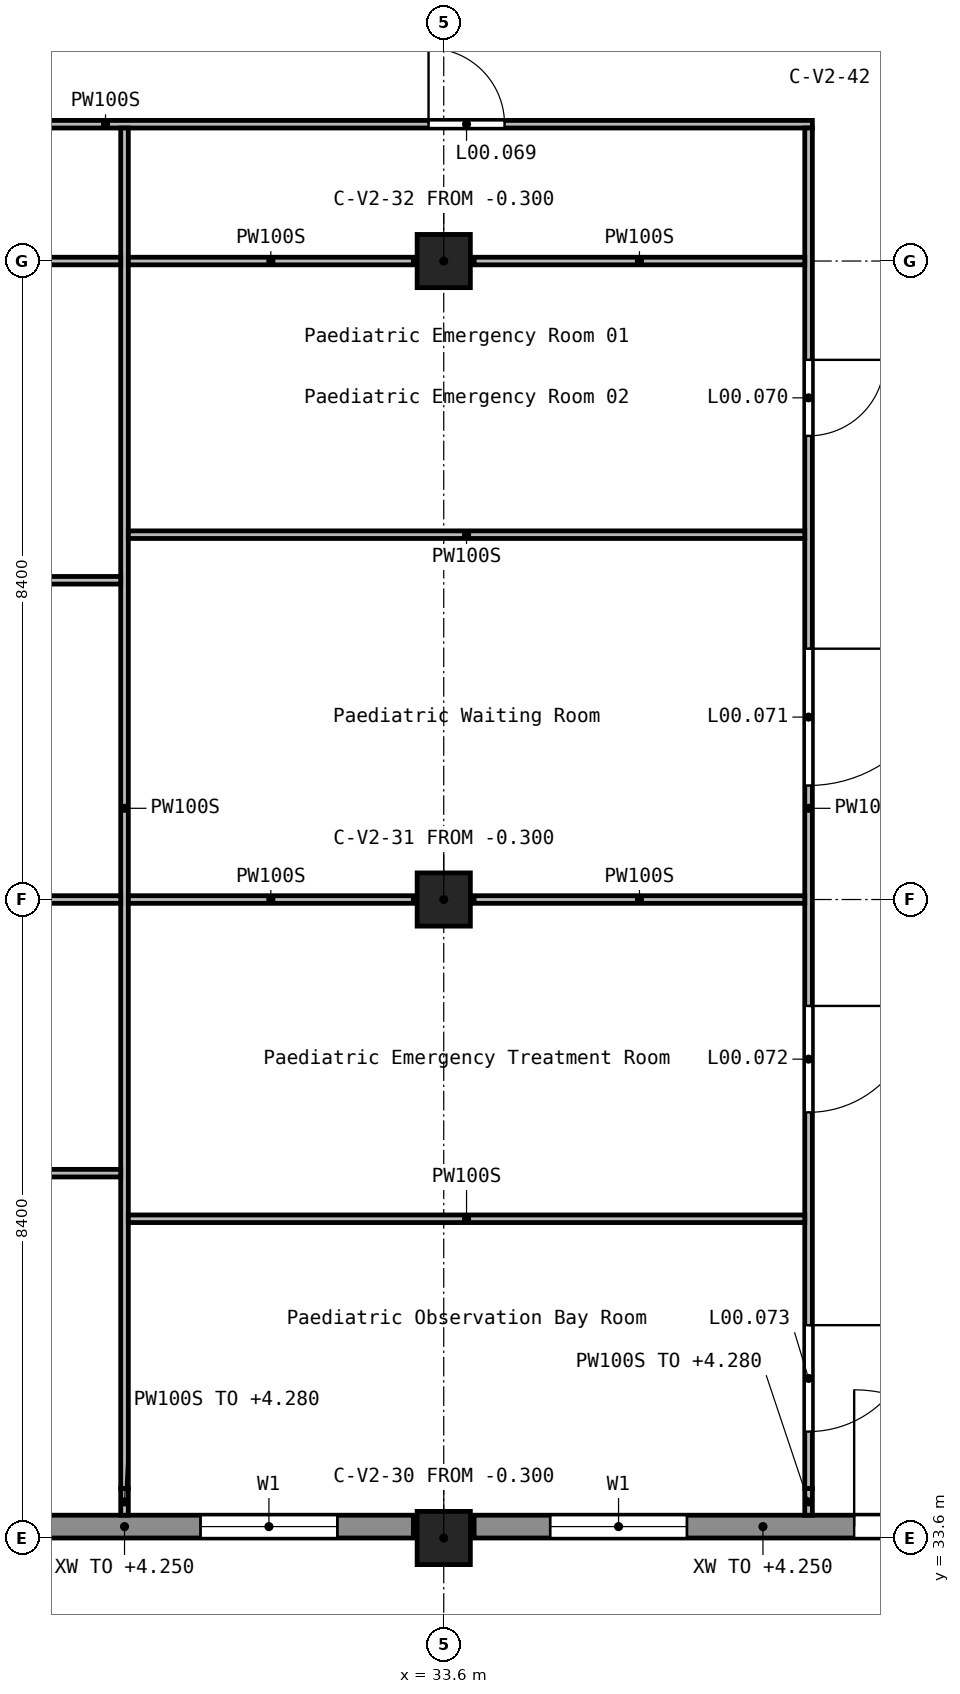
"""IFC4 building model, lengths in metres.
Left out: names, types, materials, properties, quantities, classifications, styles, units other than length and angle.
Written with IfcOpenShell. Run it as: python <this file> out.ifc"""

import sys

from ifc_helpers import new_model, si_unit, direction, frame, frame_2d, origin, origin_2d, place, context, subcontext, project, spatial, rectangle, extrude, element, fill, save


model = new_model("IFC4")
c1 = context("Model", 3, precision=1e-05, world=origin(), true_north=direction((0.0, 1.0)))
c2 = subcontext(c1, "Body", "Model", "MODEL_VIEW")
j1 = project(units=[si_unit("LENGTHUNIT", "METRE"), si_unit("PLANEANGLEUNIT", "RADIAN")], contexts=[c1])
p1 = place(None, origin())
s1 = spatial("IfcSite", under=j1, at=p1, CompositionType="ELEMENT")
p2 = place(p1, origin())
s2 = spatial("IfcBuilding", under=s1, at=p2, CompositionType="ELEMENT")
p3 = place(p2, origin())
s3 = spatial("IfcBuildingStorey", under=s2, at=p3, CompositionType="ELEMENT", Elevation=0.0)
for number, where, z_axis, x_axis in (
    (1, (33.6, 33.6, -0.3), (0.0, 0.0, 1.0), (1.0, 0.0, 0.0)),
    (2, (33.6, 42.0, -0.3), (0.0, 0.0, 1.0), (1.0, 0.0, 0.0)),
    (3, (33.6, 50.4, -0.3), (0.0, 0.0, 1.0), (1.0, 0.0, 0.0)),
):
    element("IfcColumn", number, at=place(p3, frame(where, z_axis=z_axis, x_axis=x_axis)), inside=s3, PredefinedType="COLUMN", context=c2, shape_type="SweptSolid", body=[
        extrude(rectangle(XDim=0.7, YDim=0.7, at=origin_2d()), origin(), (0.0, 0.0, 1.0), 5.7),
    ])
p4 = place(p3, frame((25.6, 33.75, 0.0), z_axis=(0.0, 0.0, 1.0), x_axis=(1.0, 0.0, 0.0)))
e4 = element("IfcWall", 4, at=p4, inside=s3, PredefinedType="STANDARD", context=c2, shape_type="SweptSolid", body=[
    extrude(rectangle(XDim=7.6, YDim=0.3, at=frame_2d((3.8, 0.0))), origin(), (0.0, 0.0, 1.0), 4.25),
])
p5 = place(p4, frame((1.0, 0.0, 0.9)))
e5 = element("IfcOpeningElement", 5, at=p5, cuts=e4, PredefinedType="OPENING", context=c2, shape_type="SweptSolid", body=[
    extrude(rectangle(XDim=1.8, YDim=1.5, at=frame_2d((0.9, 0.75))), frame((0.0, 0.16, 0.0), z_axis=(0.0, -1.0, 0.0), x_axis=(1.0, 0.0, 0.0)), (0.0, 0.0, 1.0), 0.32),
])
p6 = place(p4, frame((4.8, 0.0, 0.9)))
e6 = element("IfcOpeningElement", 6, at=p6, cuts=e4, PredefinedType="OPENING", context=c2, shape_type="SweptSolid", body=[
    extrude(rectangle(XDim=1.8, YDim=1.5, at=frame_2d((0.9, 0.75))), frame((0.0, 0.16, 0.0), z_axis=(0.0, -1.0, 0.0), x_axis=(1.0, 0.0, 0.0)), (0.0, 0.0, 1.0), 0.32),
])
p7 = place(p3, frame((34.0, 33.75, 0.0), z_axis=(0.0, 0.0, 1.0), x_axis=(1.0, 0.0, 0.0)))
e7 = element("IfcWall", 7, at=p7, inside=s3, PredefinedType="STANDARD", context=c2, shape_type="SweptSolid", body=[
    extrude(rectangle(XDim=7.6, YDim=0.3, at=frame_2d((3.8, 0.0))), origin(), (0.0, 0.0, 1.0), 4.25),
])
p8 = place(p7, frame((5.0, 0.0, 0.0)))
e8 = element("IfcOpeningElement", 8, at=p8, cuts=e7, PredefinedType="OPENING", context=c2, shape_type="SweptSolid", body=[
    extrude(rectangle(XDim=1.8, YDim=2.1, at=frame_2d((0.9, 1.05))), frame((0.0, 0.16, 0.0), z_axis=(0.0, -1.0, 0.0), x_axis=(1.0, 0.0, 0.0)), (0.0, 0.0, 1.0), 0.32),
])
p9 = place(p7, frame((1.0, 0.0, 0.9)))
e9 = element("IfcOpeningElement", 9, at=p9, cuts=e7, PredefinedType="OPENING", context=c2, shape_type="SweptSolid", body=[
    extrude(rectangle(XDim=1.8, YDim=1.5, at=frame_2d((0.9, 0.75))), frame((0.0, 0.16, 0.0), z_axis=(0.0, -1.0, 0.0), x_axis=(1.0, 0.0, 0.0)), (0.0, 0.0, 1.0), 0.32),
])
p10 = place(p3, frame((19.85, 52.2, 0.0), z_axis=(0.0, 0.0, 1.0), x_axis=(1.0, 0.0, 0.0)))
e10 = element("IfcWall", 10, at=p10, inside=s3, PredefinedType="PARTITIONING", context=c2, shape_type="SweptSolid", body=[
    extrude(rectangle(XDim=18.6, YDim=0.1, at=frame_2d((9.3, 0.0))), origin(), (0.0, 0.0, 1.0), 5.05),
])
p11 = place(p10, frame((4.25, 0.0, 0.0)))
e11 = element("IfcOpeningElement", 11, at=p11, cuts=e10, PredefinedType="OPENING", context=c2, shape_type="SweptSolid", body=[
    extrude(rectangle(XDim=1.0, YDim=2.1, at=frame_2d((0.5, 1.05))), frame((0.0, 0.06, 0.0), z_axis=(0.0, -1.0, 0.0), x_axis=(1.0, 0.0, 0.0)), (0.0, 0.0, 1.0), 0.12),
])
p12 = place(p10, frame((13.55, 0.0, 0.0)))
e12 = element("IfcOpeningElement", 12, at=p12, cuts=e10, PredefinedType="OPENING", context=c2, shape_type="SweptSolid", body=[
    extrude(rectangle(XDim=1.0, YDim=2.1, at=frame_2d((0.5, 1.05))), frame((0.0, 0.06, 0.0), z_axis=(0.0, -1.0, 0.0), x_axis=(1.0, 0.0, 0.0)), (0.0, 0.0, 1.0), 0.12),
])
p13 = place(p3, frame((29.4, 52.15, 0.0), z_axis=(0.0, 0.0, 1.0), x_axis=(0.0, -1.0, 0.0)))
e13 = element("IfcWall", 13, at=p13, inside=s3, PredefinedType="PARTITIONING", context=c2, shape_type="SweptSolid", body=[
    extrude(rectangle(XDim=17.9, YDim=0.1, at=frame_2d((8.95, 0.0))), origin(), (0.0, 0.0, 1.0), 5.05),
])
p14 = place(p3, frame((29.4, 34.25, 0.0), z_axis=(0.0, 0.0, 1.0), x_axis=(0.0, -1.0, 0.0)))
e14 = element("IfcWall", 14, at=p14, inside=s3, PredefinedType="PARTITIONING", context=c2, shape_type="SweptSolid", body=[
    extrude(rectangle(XDim=0.35, YDim=0.1, at=frame_2d((0.175, 0.0))), origin(), (0.0, 0.0, 1.0), 4.28),
])
p15 = place(p3, frame((38.4, 52.15, 0.0), z_axis=(0.0, 0.0, 1.0), x_axis=(0.0, -1.0, 0.0)))
e15 = element("IfcWall", 15, at=p15, inside=s3, PredefinedType="PARTITIONING", context=c2, shape_type="SweptSolid", body=[
    extrude(rectangle(XDim=17.9, YDim=0.1, at=frame_2d((8.95, 0.0))), origin(), (0.0, 0.0, 1.0), 5.05),
])
p16 = place(p15, frame((3.05, 0.0, 0.0)))
e16 = element("IfcOpeningElement", 16, at=p16, cuts=e15, PredefinedType="OPENING", context=c2, shape_type="SweptSolid", body=[
    extrude(rectangle(XDim=1.0, YDim=2.1, at=frame_2d((0.5, 1.05))), frame((0.0, 0.06, 0.0), z_axis=(0.0, -1.0, 0.0), x_axis=(1.0, 0.0, 0.0)), (0.0, 0.0, 1.0), 0.12),
])
p17 = place(p15, frame((6.85, 0.0, 0.0)))
e17 = element("IfcOpeningElement", 17, at=p17, cuts=e15, PredefinedType="OPENING", context=c2, shape_type="SweptSolid", body=[
    extrude(rectangle(XDim=1.8, YDim=2.1, at=frame_2d((0.9, 1.05))), frame((0.0, 0.06, 0.0), z_axis=(0.0, -1.0, 0.0), x_axis=(1.0, 0.0, 0.0)), (0.0, 0.0, 1.0), 0.12),
])
p18 = place(p15, frame((11.55, 0.0, 0.0)))
e18 = element("IfcOpeningElement", 18, at=p18, cuts=e15, PredefinedType="OPENING", context=c2, shape_type="SweptSolid", body=[
    extrude(rectangle(XDim=1.4, YDim=2.1, at=frame_2d((0.7, 1.05))), frame((0.0, 0.06, 0.0), z_axis=(0.0, -1.0, 0.0), x_axis=(1.0, 0.0, 0.0)), (0.0, 0.0, 1.0), 0.12),
])
p19 = place(p15, frame((15.75, 0.0, 0.0)))
e19 = element("IfcOpeningElement", 19, at=p19, cuts=e15, PredefinedType="OPENING", context=c2, shape_type="SweptSolid", body=[
    extrude(rectangle(XDim=1.4, YDim=2.1, at=frame_2d((0.7, 1.05))), frame((0.0, 0.06, 0.0), z_axis=(0.0, -1.0, 0.0), x_axis=(1.0, 0.0, 0.0)), (0.0, 0.0, 1.0), 0.12),
])
p20 = place(p3, frame((38.4, 34.25, 0.0), z_axis=(0.0, 0.0, 1.0), x_axis=(0.0, -1.0, 0.0)))
e20 = element("IfcWall", 20, at=p20, inside=s3, PredefinedType="PARTITIONING", context=c2, shape_type="SweptSolid", body=[
    extrude(rectangle(XDim=0.35, YDim=0.1, at=frame_2d((0.175, 0.0))), origin(), (0.0, 0.0, 1.0), 4.28),
])
for number, where, z_axis, x_axis in (
    (21, (25.6, 42.0, 0.0), (0.0, 0.0, 1.0), (1.0, 0.0, 0.0)),
    (22, (29.45, 42.0, 0.0), (0.0, 0.0, 1.0), (1.0, 0.0, 0.0)),
):
    element("IfcWall", number, at=place(p3, frame(where, z_axis=z_axis, x_axis=x_axis)), inside=s3, PredefinedType="PARTITIONING", context=c2, shape_type="SweptSolid", body=[
        extrude(rectangle(XDim=3.75, YDim=0.1, at=frame_2d((1.875, 0.0))), origin(), (0.0, 0.0, 1.0), 5.05),
    ])
p21 = place(p3, frame((34.0, 42.0, 0.0), z_axis=(0.0, 0.0, 1.0), x_axis=(1.0, 0.0, 0.0)))
e23 = element("IfcWall", 23, at=p21, inside=s3, PredefinedType="PARTITIONING", context=c2, shape_type="SweptSolid", body=[
    extrude(rectangle(XDim=4.35, YDim=0.1, at=frame_2d((2.175, 0.0))), origin(), (0.0, 0.0, 1.0), 5.05),
])
for number, where, z_axis, x_axis in (
    (24, (25.6, 50.4, 0.0), (0.0, 0.0, 1.0), (1.0, 0.0, 0.0)),
    (25, (29.45, 50.4, 0.0), (0.0, 0.0, 1.0), (1.0, 0.0, 0.0)),
):
    element("IfcWall", number, at=place(p3, frame(where, z_axis=z_axis, x_axis=x_axis)), inside=s3, PredefinedType="PARTITIONING", context=c2, shape_type="SweptSolid", body=[
        extrude(rectangle(XDim=3.75, YDim=0.1, at=frame_2d((1.875, 0.0))), origin(), (0.0, 0.0, 1.0), 5.05),
    ])
p22 = place(p3, frame((34.0, 50.4, 0.0), z_axis=(0.0, 0.0, 1.0), x_axis=(1.0, 0.0, 0.0)))
e26 = element("IfcWall", 26, at=p22, inside=s3, PredefinedType="PARTITIONING", context=c2, shape_type="SweptSolid", body=[
    extrude(rectangle(XDim=4.35, YDim=0.1, at=frame_2d((2.175, 0.0))), origin(), (0.0, 0.0, 1.0), 5.05),
])
for number, where, z_axis, x_axis in (
    (27, (19.85, 38.4, 0.0), (0.0, 0.0, 1.0), (1.0, 0.0, 0.0)),
    (28, (19.85, 46.2, 0.0), (0.0, 0.0, 1.0), (1.0, 0.0, 0.0)),
):
    element("IfcWall", number, at=place(p3, frame(where, z_axis=z_axis, x_axis=x_axis)), inside=s3, PredefinedType="PARTITIONING", context=c2, shape_type="SweptSolid", body=[
        extrude(rectangle(XDim=9.5, YDim=0.1, at=frame_2d((4.75, 0.0))), origin(), (0.0, 0.0, 1.0), 5.05),
    ])
for number, where, z_axis, x_axis in (
    (29, (29.45, 37.8, 0.0), (0.0, 0.0, 1.0), (1.0, 0.0, 0.0)),
    (30, (29.45, 46.8, 0.0), (0.0, 0.0, 1.0), (1.0, 0.0, 0.0)),
):
    element("IfcWall", number, at=place(p3, frame(where, z_axis=z_axis, x_axis=x_axis)), inside=s3, PredefinedType="PARTITIONING", context=c2, shape_type="SweptSolid", body=[
        extrude(rectangle(XDim=8.9, YDim=0.1, at=frame_2d((4.45, 0.0))), origin(), (0.0, 0.0, 1.0), 5.05),
    ])
p23 = place(p8, frame((1.8, 0.0, 0.0), z_axis=(0.0, 0.0, 1.0), x_axis=(-1.0, 0.0, 0.0)))
e31 = element("IfcDoor", 31, at=p23, inside=s3, OperationType="SINGLE_SWING_LEFT", PredefinedType="DOOR", context=c2, shape_type="SweptSolid", body=[
    extrude(rectangle(XDim=1.8, YDim=2.1, at=frame_2d((0.9, 1.05))), frame((0.0, 0.025, 0.0), z_axis=(0.0, -1.0, 0.0), x_axis=(1.0, 0.0, 0.0)), (0.0, 0.0, 1.0), 0.05),
])
fill(e8, e31)
p24 = place(p6, origin())
e32 = element("IfcWindow", 32, at=p24, inside=s3, PartitioningType="SINGLE_PANEL", PredefinedType="WINDOW", context=c2, shape_type="SweptSolid", body=[
    extrude(rectangle(XDim=1.8, YDim=1.5, at=frame_2d((0.9, 0.75))), frame((0.0, 0.03, 0.0), z_axis=(0.0, -1.0, 0.0), x_axis=(1.0, 0.0, 0.0)), (0.0, 0.0, 1.0), 0.06),
])
fill(e6, e32)
p25 = place(p9, origin())
e33 = element("IfcWindow", 33, at=p25, inside=s3, PartitioningType="SINGLE_PANEL", PredefinedType="WINDOW", context=c2, shape_type="SweptSolid", body=[
    extrude(rectangle(XDim=1.8, YDim=1.5, at=frame_2d((0.9, 0.75))), frame((0.0, 0.03, 0.0), z_axis=(0.0, -1.0, 0.0), x_axis=(1.0, 0.0, 0.0)), (0.0, 0.0, 1.0), 0.06),
])
fill(e9, e33)
p26 = place(p12, frame((1.0, 0.0, 0.0), z_axis=(0.0, 0.0, 1.0), x_axis=(-1.0, 0.0, 0.0)))
e34 = element("IfcDoor", 34, at=p26, inside=s3, OperationType="SINGLE_SWING_LEFT", PredefinedType="DOOR", context=c2, shape_type="SweptSolid", body=[
    extrude(rectangle(XDim=1.0, YDim=2.1, at=frame_2d((0.5, 1.05))), frame((0.0, 0.025, 0.0), z_axis=(0.0, -1.0, 0.0), x_axis=(1.0, 0.0, 0.0)), (0.0, 0.0, 1.0), 0.05),
])
fill(e12, e34)
p27 = place(p16, frame((1.0, 0.0, 0.0), z_axis=(0.0, 0.0, 1.0), x_axis=(-1.0, 0.0, 0.0)))
e35 = element("IfcDoor", 35, at=p27, inside=s3, OperationType="SINGLE_SWING_RIGHT", PredefinedType="DOOR", context=c2, shape_type="SweptSolid", body=[
    extrude(rectangle(XDim=1.0, YDim=2.1, at=frame_2d((0.5, 1.05))), frame((0.0, 0.025, 0.0), z_axis=(0.0, -1.0, 0.0), x_axis=(1.0, 0.0, 0.0)), (0.0, 0.0, 1.0), 0.05),
])
fill(e16, e35)
p28 = place(p17, frame((1.8, 0.0, 0.0), z_axis=(0.0, 0.0, 1.0), x_axis=(-1.0, 0.0, 0.0)))
e36 = element("IfcDoor", 36, at=p28, inside=s3, OperationType="DOUBLE_DOOR_SINGLE_SWING", PredefinedType="DOOR", context=c2, shape_type="SweptSolid", body=[
    extrude(rectangle(XDim=1.8, YDim=2.1, at=frame_2d((0.9, 1.05))), frame((0.0, 0.025, 0.0), z_axis=(0.0, -1.0, 0.0), x_axis=(1.0, 0.0, 0.0)), (0.0, 0.0, 1.0), 0.05),
])
fill(e17, e36)
p29 = place(p18, frame((1.4, 0.0, 0.0), z_axis=(0.0, 0.0, 1.0), x_axis=(-1.0, 0.0, 0.0)))
e37 = element("IfcDoor", 37, at=p29, inside=s3, OperationType="DOUBLE_DOOR_SINGLE_SWING", PredefinedType="DOOR", context=c2, shape_type="SweptSolid", body=[
    extrude(rectangle(XDim=1.4, YDim=2.1, at=frame_2d((0.7, 1.05))), frame((0.0, 0.025, 0.0), z_axis=(0.0, -1.0, 0.0), x_axis=(1.0, 0.0, 0.0)), (0.0, 0.0, 1.0), 0.05),
])
fill(e18, e37)
p30 = place(p19, frame((1.4, 0.0, 0.0), z_axis=(0.0, 0.0, 1.0), x_axis=(-1.0, 0.0, 0.0)))
e38 = element("IfcDoor", 38, at=p30, inside=s3, OperationType="DOUBLE_DOOR_SINGLE_SWING", PredefinedType="DOOR", context=c2, shape_type="SweptSolid", body=[
    extrude(rectangle(XDim=1.4, YDim=2.1, at=frame_2d((0.7, 1.05))), frame((0.0, 0.025, 0.0), z_axis=(0.0, -1.0, 0.0), x_axis=(1.0, 0.0, 0.0)), (0.0, 0.0, 1.0), 0.05),
])
fill(e19, e38)
save(model, sys.argv[1])
